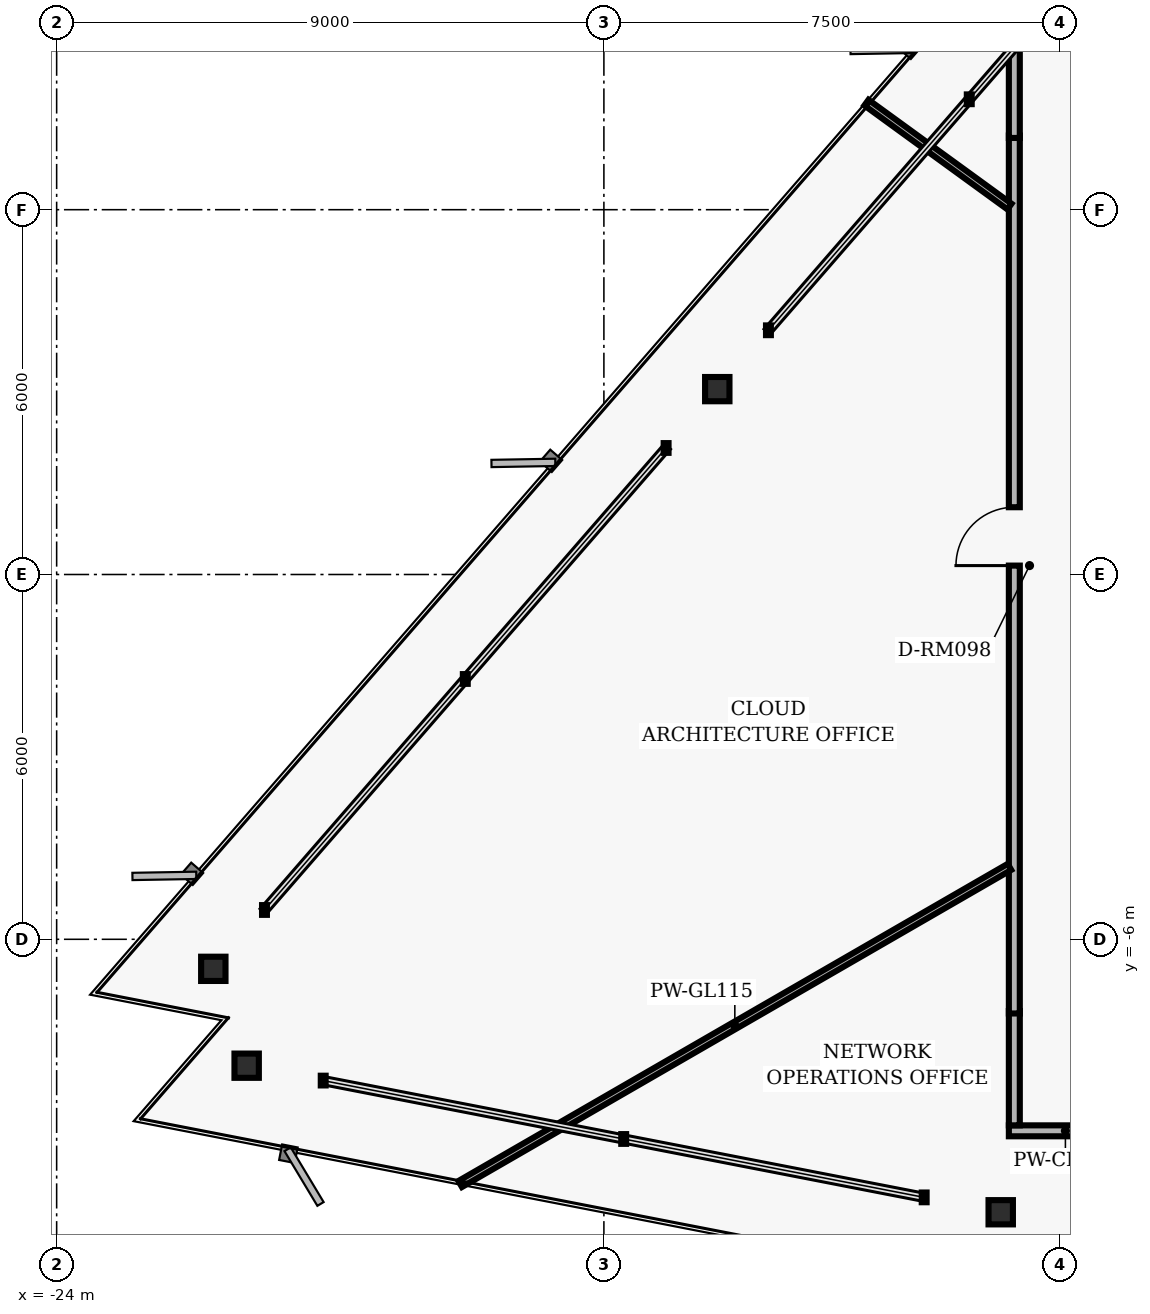
"""IFC4 building model, lengths in metres.
Left out: names, types, materials, properties, quantities, classifications, styles, units other than length and angle.
Written with IfcOpenShell. Run it as: python <this file> out.ifc"""

import sys

from ifc_helpers import new_model, si_unit, direction, frame, frame_2d, origin, origin_2d, place, context, subcontext, project, spatial, rectangle, i_section, extrude, element, fill, save


model = new_model("IFC4")
c1 = context("Model", 3, precision=1e-05, world=origin(), true_north=direction((0.0, 1.0)))
c2 = subcontext(c1, "Body", "Model", "MODEL_VIEW")
j1 = project(units=[si_unit("LENGTHUNIT", "METRE"), si_unit("PLANEANGLEUNIT", "RADIAN")], contexts=[c1])
p1 = place(None, origin())
s1 = spatial("IfcSite", under=j1, at=p1, CompositionType="ELEMENT")
p2 = place(p1, origin())
s2 = spatial("IfcBuilding", under=s1, at=p2, CompositionType="ELEMENT")
p3 = place(p2, frame((0.0, 0.0, 150.24)))
s3 = spatial("IfcBuildingStorey", under=s2, at=p3, CompositionType="ELEMENT", Elevation=150.24)
for number, where, z_axis, x_axis in (
    (1, (-13.135, 3.049, 0.0), (0.0, 0.0, 1.0), (1.0, 0.0, 0.0)),
    (2, (-21.424, -6.486, 0.0), (0.0, 0.0, 1.0), (1.0, 0.0, 0.0)),
    (3, (-20.875, -8.079, 0.0), (0.0, 0.0, 1.0), (1.0, 0.0, 0.0)),
    (4, (-8.474, -10.49, 0.0), (0.0, 0.0, 1.0), (1.0, 0.0, 0.0)),
):
    element("IfcColumn", number, at=place(p3, frame(where, z_axis=z_axis, x_axis=x_axis)), inside=s3, PredefinedType="COLUMN", context=c2, shape_type="SweptSolid", body=[
        extrude(i_section(OverallWidth=0.401, OverallDepth=0.399, WebThickness=0.025, FlangeThickness=0.04, FilletRadius=0.018, at=origin_2d()), origin(), (0.0, 0.0, 1.0), 3.04),
    ])
p4 = place(p3, frame((-6.48, -9.15, 0.0), z_axis=(0.0, 0.0, 1.0), x_axis=(-1.0, 0.0, 0.0)))
e5 = element("IfcWall", 5, at=p4, inside=s3, PredefinedType="PARTITIONING", context=c2, shape_type="SweptSolid", body=[
    extrude(rectangle(XDim=1.86, YDim=0.18, at=frame_2d((0.93, 0.0))), origin(), (0.0, 0.0, 1.0), 2.33),
])
p5 = place(p3, frame((-8.25, -9.06, 0.0), z_axis=(0.0, 0.0, 1.0), x_axis=(0.0, 1.0, 0.0)))
e6 = element("IfcWall", 6, at=p5, inside=s3, PredefinedType="PARTITIONING", context=c2, shape_type="SweptSolid", body=[
    extrude(rectangle(XDim=1.88, YDim=0.18, at=frame_2d((0.94, 0.0))), origin(), (0.0, 0.0, 1.0), 2.763),
])
p6 = place(p3, frame((-8.25, -7.22, 0.0), z_axis=(0.0, 0.0, 1.0), x_axis=(0.0, 1.0, 0.0)))
e7 = element("IfcWall", 7, at=p6, inside=s3, PredefinedType="PARTITIONING", context=c2, shape_type="SweptSolid", body=[
    extrude(rectangle(XDim=14.44, YDim=0.18, at=frame_2d((7.22, 0.0))), origin(), (0.0, 0.0, 1.0), 2.763),
])
p7 = place(p6, frame((7.366, 0.0, 0.0)))
e8 = element("IfcOpeningElement", 8, at=p7, cuts=e7, PredefinedType="OPENING", context=c2, shape_type="SweptSolid", body=[
    extrude(rectangle(XDim=0.96, YDim=2.02, at=frame_2d((0.48, 1.01))), frame((0.0, 0.1, 0.0), z_axis=(0.0, -1.0, 0.0), x_axis=(1.0, 0.0, 0.0)), (0.0, 0.0, 1.0), 0.2),
])
p8 = place(p3, frame((-8.25, 7.18, 0.0), z_axis=(0.0, 0.0, 1.0), x_axis=(0.0, 1.0, 0.0)))
e9 = element("IfcWall", 9, at=p8, inside=s3, PredefinedType="PARTITIONING", context=c2, shape_type="SweptSolid", body=[
    extrude(rectangle(XDim=1.88, YDim=0.18, at=frame_2d((0.94, 0.0))), origin(), (0.0, 0.0, 1.0), 2.763),
])
p9 = place(p3, frame((-8.33, -4.809, 0.0), z_axis=(0.0, 0.0, 1.0), x_axis=(-0.866024997974, -0.500000702884, 0.0)))
e10 = element("IfcWall", 10, at=p9, inside=s3, PredefinedType="MOVABLE", context=c2, shape_type="SweptSolid", body=[
    extrude(rectangle(XDim=10.431, YDim=0.115, at=frame_2d((5.215, 0.0))), origin(), (0.0, 0.0, 1.0), 2.132),
])
p10 = place(p3, frame((-8.33, 6.052, 0.0), z_axis=(0.0, 0.0, 1.0), x_axis=(-0.808997455981, 0.587812143644, 0.0)))
e11 = element("IfcWall", 11, at=p10, inside=s3, PredefinedType="MOVABLE", context=c2, shape_type="SweptSolid", body=[
    extrude(rectangle(XDim=2.907, YDim=0.115, at=frame_2d((1.454, 0.0))), origin(), (0.0, 0.0, 1.0), 2.763),
])
p11 = place(p7, origin())
e12 = element("IfcDoor", 12, at=p11, inside=s3, OperationType="SINGLE_SWING_LEFT", PredefinedType="DOOR", context=c2, shape_type="SweptSolid", body=[
    extrude(rectangle(XDim=0.96, YDim=2.02, at=frame_2d((0.48, 1.01))), frame((0.0, 0.025, 0.0), z_axis=(0.0, -1.0, 0.0), x_axis=(1.0, 0.0, 0.0)), (0.0, 0.0, 1.0), 0.05),
])
fill(e8, e12)
save(model, sys.argv[1])
